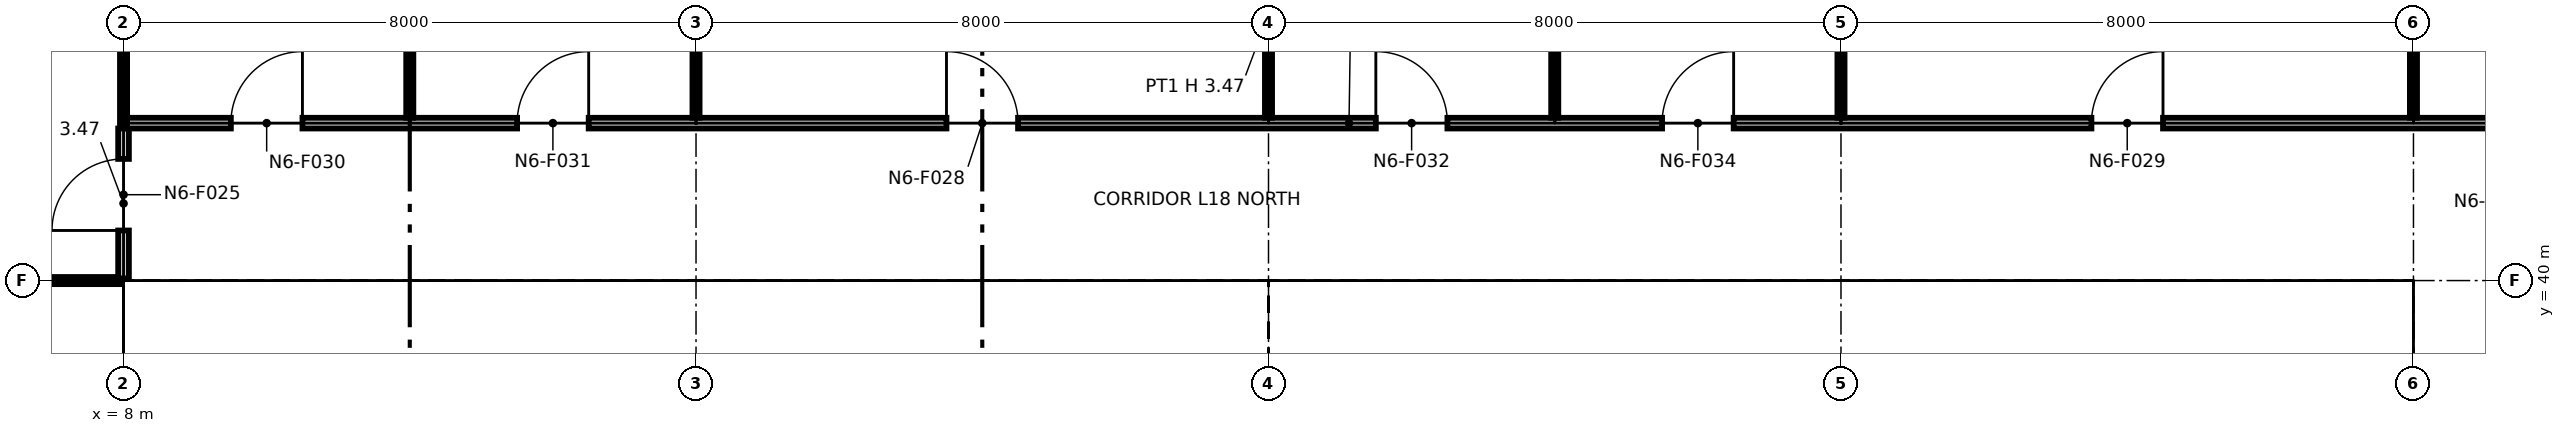
"""IFC4 building model, lengths in metres.
Left out: names, types, materials, properties, quantities, classifications, styles, units other than length and angle.
Written with IfcOpenShell. Run it as: python <this file> out.ifc"""

import sys

from ifc_helpers import new_model, si_unit, direction, frame, frame_2d, origin, origin_2d, place, context, subcontext, project, spatial, polyline, rectangle, i_section, outline, extrude, element, fill, save


model = new_model("IFC4")
c1 = context("Model", 3, precision=1e-05, world=origin(), true_north=direction((0.0, 1.0)))
c2 = subcontext(c1, "Body", "Model", "MODEL_VIEW")
j1 = project(units=[si_unit("LENGTHUNIT", "METRE"), si_unit("PLANEANGLEUNIT", "RADIAN")], contexts=[c1])
p1 = place(None, origin())
s1 = spatial("IfcSite", under=j1, at=p1, CompositionType="ELEMENT")
p2 = place(p1, origin())
s2 = spatial("IfcBuilding", under=s1, at=p2, CompositionType="ELEMENT")
p3 = place(p2, frame((0.0, 0.0, 96.4)))
s3 = spatial("IfcBuildingStorey", under=s2, at=p3, CompositionType="ELEMENT", Elevation=96.4)
for number, where, z_axis, x_axis in (
    (1, (8.0, 40.0, 0.0), (0.0, 0.0, 1.0), (1.0, 0.0, 0.0)),
    (2, (16.0, 40.0, 0.0), (0.0, 0.0, 1.0), (1.0, 0.0, 0.0)),
):
    element("IfcColumn", number, at=place(p3, frame(where, z_axis=z_axis, x_axis=x_axis)), inside=s3, PredefinedType="COLUMN", context=c2, shape_type="SweptSolid", body=[
        extrude(i_section(OverallWidth=0.373, OverallDepth=0.368, WebThickness=0.015, FlangeThickness=0.024, at=origin_2d()), origin(), (0.0, 0.0, 1.0), 4.25),
    ])
p4 = place(p3, frame((24.0, 40.0, 0.0), z_axis=(0.0, 0.0, 1.0), x_axis=(1.0, 0.0, 0.0)))
e3 = element("IfcColumn", 3, at=p4, inside=s3, PredefinedType="COLUMN", context=c2, shape_type="SweptSolid", body=[
    extrude(i_section(OverallWidth=0.394, OverallDepth=0.376, WebThickness=0.017, FlangeThickness=0.028, at=origin_2d()), origin(), (0.0, 0.0, 1.0), 4.25),
])
for number, where, z_axis, x_axis in (
    (4, (32.0, 40.0, 0.0), (0.0, 0.0, 1.0), (1.0, 0.0, 0.0)),
    (5, (40.0, 40.0, 0.0), (0.0, 0.0, 1.0), (1.0, 0.0, 0.0)),
):
    element("IfcColumn", number, at=place(p3, frame(where, z_axis=z_axis, x_axis=x_axis)), inside=s3, PredefinedType="COLUMN", context=c2, shape_type="SweptSolid", body=[
        extrude(i_section(OverallWidth=0.257, OverallDepth=0.363, WebThickness=0.013, FlangeThickness=0.022, at=origin_2d()), origin(), (0.0, 0.0, 1.0), 4.25),
    ])
p5 = place(p3, frame((8.75, 32.85, 0.0), z_axis=(0.0, 0.0, 1.0), x_axis=(0.0, 1.0, 0.0)))
e6 = element("IfcWall", 6, at=p5, inside=s3, PredefinedType="PARTITIONING", context=c2, shape_type="SweptSolid", body=[
    extrude(outline(polyline([(0.0, 0.0), (6.3, 0.0), (6.3, 4.25), (3.231, 4.25), (3.23, 3.789), (3.07, 3.789), (3.069, 4.25), (0.0, 4.25), (0.0, 0.0)])), frame((0.0, 0.1, 0.0), z_axis=(0.0, -1.0, 0.0), x_axis=(1.0, 0.0, 0.0)), (0.0, 0.0, 1.0), 0.2),
])
p6 = place(p3, frame((8.65, 39.25, 0.0), z_axis=(0.0, 0.0, 1.0), x_axis=(1.0, 0.0, 0.0)))
e7 = element("IfcWall", 7, at=p6, inside=s3, PredefinedType="PARTITIONING", context=c2, shape_type="SweptSolid", body=[
    extrude(outline(polyline([(0.0, 0.0), (14.7, 0.0), (14.7, 4.25), (7.469, 4.25), (7.469, 3.632), (7.231, 3.632), (7.23, 4.25), (0.0, 4.25), (0.0, 0.0)])), frame((0.0, 0.1, 0.0), z_axis=(0.0, -1.0, 0.0), x_axis=(1.0, 0.0, 0.0)), (0.0, 0.0, 1.0), 0.2),
])
for number, where, z_axis, x_axis in (
    (8, (10.675, 34.95, 0.0), (0.0, 0.0, 1.0), (0.0, 1.0, 0.0)),
    (9, (12.425, 34.95, 0.0), (0.0, 0.0, 1.0), (0.0, 1.0, 0.0)),
    (10, (14.275, 34.95, 0.0), (0.0, 0.0, 1.0), (0.0, 1.0, 0.0)),
):
    element("IfcWall", number, at=place(p3, frame(where, z_axis=z_axis, x_axis=x_axis)), inside=s3, PredefinedType="PARTITIONING", context=c2, shape_type="SweptSolid", body=[
        extrude(outline(polyline([(0.0, 0.0), (4.2, 0.0), (4.2, 4.25), (1.132, 4.25), (1.131, 3.789), (0.969, 3.789), (0.969, 4.25), (0.0, 4.25), (0.0, 0.0)])), frame((0.0, 0.075, 0.0), z_axis=(0.0, -1.0, 0.0), x_axis=(1.0, 0.0, 0.0)), (0.0, 0.0, 1.0), 0.15),
    ])
p7 = place(p3, frame((16.0, 34.95, 0.0), z_axis=(0.0, 0.0, 1.0), x_axis=(0.0, 1.0, 0.0)))
e11 = element("IfcWall", 11, at=p7, inside=s3, PredefinedType="PARTITIONING", context=c2, shape_type="SweptSolid", body=[
    extrude(rectangle(XDim=4.2, YDim=0.6, at=frame_2d((2.1, 0.0))), origin(), (0.0, 0.0, 1.0), 3.632),
])
for number, where, z_axis, x_axis in (
    (12, (19.2, 32.85, 0.0), (0.0, 0.0, 1.0), (0.0, 1.0, 0.0)),
    (13, (23.25, 32.85, 0.0), (0.0, 0.0, 1.0), (0.0, 1.0, 0.0)),
):
    element("IfcWall", number, at=place(p3, frame(where, z_axis=z_axis, x_axis=x_axis)), inside=s3, PredefinedType="PARTITIONING", context=c2, shape_type="SweptSolid", body=[
        extrude(rectangle(XDim=6.3, YDim=0.2, at=frame_2d((3.15, 0.0))), origin(), (0.0, 0.0, 1.0), 4.25),
    ])
p8 = place(p3, frame((24.75, 32.85, 0.0), z_axis=(0.0, 0.0, 1.0), x_axis=(0.0, 1.0, 0.0)))
e14 = element("IfcWall", 14, at=p8, inside=s3, PredefinedType="PARTITIONING", context=c2, shape_type="SweptSolid", body=[
    extrude(outline(polyline([(0.0, 0.0), (6.3, 0.0), (6.3, 4.25), (3.231, 4.25), (3.23, 3.789), (3.07, 3.789), (3.069, 4.25), (0.0, 4.25), (0.0, 0.0)])), frame((0.0, 0.1, 0.0), z_axis=(0.0, -1.0, 0.0), x_axis=(1.0, 0.0, 0.0)), (0.0, 0.0, 1.0), 0.2),
])
p9 = place(p3, frame((24.65, 39.25, 0.0), z_axis=(0.0, 0.0, 1.0), x_axis=(1.0, 0.0, 0.0)))
e15 = element("IfcWall", 15, at=p9, inside=s3, PredefinedType="PARTITIONING", context=c2, shape_type="SweptSolid", body=[
    extrude(outline(polyline([(0.0, 0.0), (14.7, 0.0), (14.7, 4.25), (7.469, 4.25), (7.469, 3.632), (7.231, 3.632), (7.23, 4.25), (0.0, 4.25), (0.0, 0.0)])), frame((0.0, 0.1, 0.0), z_axis=(0.0, -1.0, 0.0), x_axis=(1.0, 0.0, 0.0)), (0.0, 0.0, 1.0), 0.2),
])
for number, where, z_axis, x_axis in (
    (16, (27.2, 36.4, 0.0), (0.0, 0.0, 1.0), (0.0, 1.0, 0.0)),
    (17, (29.5, 36.4, 0.0), (0.0, 0.0, 1.0), (0.0, 1.0, 0.0)),
):
    element("IfcWall", number, at=place(p3, frame(where, z_axis=z_axis, x_axis=x_axis)), inside=s3, PredefinedType="PARTITIONING", context=c2, shape_type="SweptSolid", body=[
        extrude(rectangle(XDim=2.75, YDim=0.2, at=frame_2d((1.375, 0.0))), origin(), (0.0, 0.0, 1.0), 4.25),
    ])
p10 = place(p3, frame((32.0, 32.85, 0.0), z_axis=(0.0, 0.0, 1.0), x_axis=(0.0, 1.0, 0.0)))
e18 = element("IfcWall", 18, at=p10, inside=s3, PredefinedType="PARTITIONING", context=c2, shape_type="SweptSolid", body=[
    extrude(rectangle(XDim=6.3, YDim=0.6, at=frame_2d((3.15, 0.0))), origin(), (0.0, 0.0, 1.0), 3.632),
])
for number, where, z_axis, x_axis in (
    (19, (35.6, 32.85, 0.0), (0.0, 0.0, 1.0), (0.0, 1.0, 0.0)),
    (20, (39.25, 32.85, 0.0), (0.0, 0.0, 1.0), (0.0, 1.0, 0.0)),
):
    element("IfcWall", number, at=place(p3, frame(where, z_axis=z_axis, x_axis=x_axis)), inside=s3, PredefinedType="PARTITIONING", context=c2, shape_type="SweptSolid", body=[
        extrude(rectangle(XDim=6.3, YDim=0.2, at=frame_2d((3.15, 0.0))), origin(), (0.0, 0.0, 1.0), 4.25),
    ])
p11 = place(p3, frame((4.05, 40.0, 0.0), z_axis=(0.0, 0.0, 1.0), x_axis=(1.0, 0.0, 0.0)))
e21 = element("IfcWall", 21, at=p11, inside=s3, PredefinedType="PARTITIONING", context=c2, shape_type="SweptSolid", body=[
    extrude(rectangle(XDim=3.92, YDim=0.1, at=frame_2d((1.96, 0.0))), origin(), (0.0, 0.0, 1.0), 3.47),
])
p12 = place(p3, frame((8.0, 40.03, 0.0), z_axis=(0.0, 0.0, 1.0), x_axis=(0.0, 1.0, 0.0)))
e22 = element("IfcWall", 22, at=p12, inside=s3, PredefinedType="PARTITIONING", context=c2, shape_type="SweptSolid", body=[
    extrude(rectangle(XDim=2.095, YDim=0.15, at=frame_2d((1.047, 0.0))), origin(), (0.0, 0.0, 1.0), 3.47),
])
p13 = place(p12, frame((0.67, 0.0, 0.0)))
e23 = element("IfcOpeningElement", 23, at=p13, cuts=e22, PredefinedType="OPENING", context=c2, shape_type="SweptSolid", body=[
    extrude(rectangle(XDim=1.0, YDim=2.1, at=frame_2d((0.5, 1.05))), frame((0.0, 0.085, 0.0), z_axis=(0.0, -1.0, 0.0), x_axis=(1.0, 0.0, 0.0)), (0.0, 0.0, 1.0), 0.17),
])
p14 = place(p3, frame((8.05, 42.2, 0.0), z_axis=(0.0, 0.0, 1.0), x_axis=(1.0, 0.0, 0.0)))
e24 = element("IfcWall", 24, at=p14, inside=s3, PredefinedType="PARTITIONING", context=c2, shape_type="SweptSolid", body=[
    extrude(rectangle(XDim=34.15, YDim=0.15, at=frame_2d((17.075, 0.0))), origin(), (0.0, 0.0, 1.0), 4.25),
])
p15 = place(p14, frame((11.45, 0.0, 0.0)))
e25 = element("IfcOpeningElement", 25, at=p15, cuts=e24, PredefinedType="OPENING", context=c2, shape_type="SweptSolid", body=[
    extrude(rectangle(XDim=1.0, YDim=2.1, at=frame_2d((0.5, 1.05))), frame((0.0, 0.085, 0.0), z_axis=(0.0, -1.0, 0.0), x_axis=(1.0, 0.0, 0.0)), (0.0, 0.0, 1.0), 0.17),
])
p16 = place(p14, frame((27.45, 0.0, 0.0)))
e26 = element("IfcOpeningElement", 26, at=p16, cuts=e24, PredefinedType="OPENING", context=c2, shape_type="SweptSolid", body=[
    extrude(rectangle(XDim=1.0, YDim=2.1, at=frame_2d((0.5, 1.05))), frame((0.0, 0.085, 0.0), z_axis=(0.0, -1.0, 0.0), x_axis=(1.0, 0.0, 0.0)), (0.0, 0.0, 1.0), 0.17),
])
p17 = place(p14, frame((1.45, 0.0, 0.0)))
e27 = element("IfcOpeningElement", 27, at=p17, cuts=e24, PredefinedType="OPENING", context=c2, shape_type="SweptSolid", body=[
    extrude(rectangle(XDim=1.0, YDim=2.1, at=frame_2d((0.5, 1.05))), frame((0.0, 0.085, 0.0), z_axis=(0.0, -1.0, 0.0), x_axis=(1.0, 0.0, 0.0)), (0.0, 0.0, 1.0), 0.17),
])
p18 = place(p14, frame((5.45, 0.0, 0.0)))
e28 = element("IfcOpeningElement", 28, at=p18, cuts=e24, PredefinedType="OPENING", context=c2, shape_type="SweptSolid", body=[
    extrude(rectangle(XDim=1.0, YDim=2.1, at=frame_2d((0.5, 1.05))), frame((0.0, 0.085, 0.0), z_axis=(0.0, -1.0, 0.0), x_axis=(1.0, 0.0, 0.0)), (0.0, 0.0, 1.0), 0.17),
])
p19 = place(p14, frame((17.45, 0.0, 0.0)))
e29 = element("IfcOpeningElement", 29, at=p19, cuts=e24, PredefinedType="OPENING", context=c2, shape_type="SweptSolid", body=[
    extrude(rectangle(XDim=1.0, YDim=2.1, at=frame_2d((0.5, 1.05))), frame((0.0, 0.085, 0.0), z_axis=(0.0, -1.0, 0.0), x_axis=(1.0, 0.0, 0.0)), (0.0, 0.0, 1.0), 0.17),
])
p20 = place(p14, frame((21.45, 0.0, 0.0)))
e30 = element("IfcOpeningElement", 30, at=p20, cuts=e24, PredefinedType="OPENING", context=c2, shape_type="SweptSolid", body=[
    extrude(rectangle(XDim=1.0, YDim=2.1, at=frame_2d((0.5, 1.05))), frame((0.0, 0.085, 0.0), z_axis=(0.0, -1.0, 0.0), x_axis=(1.0, 0.0, 0.0)), (0.0, 0.0, 1.0), 0.17),
])
p21 = place(p3, frame((8.0, 42.2, 0.0), z_axis=(0.0, 0.0, 1.0), x_axis=(0.0, 1.0, 0.0)))
e31 = element("IfcWall", 31, at=p21, inside=s3, PredefinedType="PARTITIONING", context=c2, shape_type="SweptSolid", body=[
    extrude(rectangle(XDim=5.67, YDim=0.1, at=frame_2d((2.835, 0.0))), origin(), (0.0, 0.0, 1.0), 3.47),
])
p22 = place(p3, frame((12.0, 42.275, 0.0), z_axis=(0.0, 0.0, 1.0), x_axis=(0.0, 1.0, 0.0)))
e32 = element("IfcWall", 32, at=p22, inside=s3, PredefinedType="PARTITIONING", context=c2, shape_type="SweptSolid", body=[
    extrude(outline(polyline([(0.0, 0.0), (5.595, 0.0), (5.595, 4.25), (2.025, 4.25), (2.023, 3.47), (1.427, 3.47), (1.425, 4.25), (0.0, 4.25), (0.0, 0.0)])), frame((0.0, 0.05, 0.0), z_axis=(0.0, -1.0, 0.0), x_axis=(1.0, 0.0, 0.0)), (0.0, 0.0, 1.0), 0.1),
])
for number, where, z_axis, x_axis in (
    (33, (16.0, 42.275, 0.0), (0.0, 0.0, 1.0), (0.0, 1.0, 0.0)),
    (34, (24.0, 42.275, 0.0), (0.0, 0.0, 1.0), (0.0, 1.0, 0.0)),
):
    element("IfcWall", number, at=place(p3, frame(where, z_axis=z_axis, x_axis=x_axis)), inside=s3, PredefinedType="PARTITIONING", context=c2, shape_type="SweptSolid", body=[
        extrude(rectangle(XDim=2.895, YDim=0.1, at=frame_2d((1.448, 0.0))), origin(), (0.0, 0.0, 1.0), 3.47),
    ])
p23 = place(p3, frame((28.0, 42.275, 0.0), z_axis=(0.0, 0.0, 1.0), x_axis=(0.0, 1.0, 0.0)))
e35 = element("IfcWall", 35, at=p23, inside=s3, PredefinedType="PARTITIONING", context=c2, shape_type="SweptSolid", body=[
    extrude(rectangle(XDim=3.375, YDim=0.1, at=frame_2d((1.688, 0.0))), origin(), (0.0, 0.0, 1.0), 3.47),
])
for number, where, z_axis, x_axis in (
    (36, (32.0, 42.275, 0.0), (0.0, 0.0, 1.0), (0.0, 1.0, 0.0)),
    (37, (40.0, 42.275, 0.0), (0.0, 0.0, 1.0), (0.0, 1.0, 0.0)),
):
    element("IfcWall", number, at=place(p3, frame(where, z_axis=z_axis, x_axis=x_axis)), inside=s3, PredefinedType="PARTITIONING", context=c2, shape_type="SweptSolid", body=[
        extrude(rectangle(XDim=2.895, YDim=0.1, at=frame_2d((1.448, 0.0))), origin(), (0.0, 0.0, 1.0), 3.47),
    ])
p24 = place(p13, origin())
e38 = element("IfcDoor", 38, at=p24, inside=s3, OperationType="SINGLE_SWING_LEFT", PredefinedType="DOOR", context=c2, shape_type="SweptSolid", body=[
    extrude(rectangle(XDim=1.0, YDim=2.1, at=frame_2d((0.5, 1.05))), frame((0.0, 0.025, 0.0), z_axis=(0.0, -1.0, 0.0), x_axis=(1.0, 0.0, 0.0)), (0.0, 0.0, 1.0), 0.05),
])
fill(e23, e38)
p25 = place(p15, origin())
e39 = element("IfcDoor", 39, at=p25, inside=s3, OperationType="SINGLE_SWING_LEFT", PredefinedType="DOOR", context=c2, shape_type="SweptSolid", body=[
    extrude(rectangle(XDim=1.0, YDim=2.1, at=frame_2d((0.5, 1.05))), frame((0.0, 0.025, 0.0), z_axis=(0.0, -1.0, 0.0), x_axis=(1.0, 0.0, 0.0)), (0.0, 0.0, 1.0), 0.05),
])
fill(e25, e39)
p26 = place(p16, origin())
e40 = element("IfcDoor", 40, at=p26, inside=s3, OperationType="SINGLE_SWING_RIGHT", PredefinedType="DOOR", context=c2, shape_type="SweptSolid", body=[
    extrude(rectangle(XDim=1.0, YDim=2.1, at=frame_2d((0.5, 1.05))), frame((0.0, 0.025, 0.0), z_axis=(0.0, -1.0, 0.0), x_axis=(1.0, 0.0, 0.0)), (0.0, 0.0, 1.0), 0.05),
])
fill(e26, e40)
p27 = place(p17, origin())
e41 = element("IfcDoor", 41, at=p27, inside=s3, OperationType="SINGLE_SWING_RIGHT", PredefinedType="DOOR", context=c2, shape_type="SweptSolid", body=[
    extrude(rectangle(XDim=1.0, YDim=2.1, at=frame_2d((0.5, 1.05))), frame((0.0, 0.025, 0.0), z_axis=(0.0, -1.0, 0.0), x_axis=(1.0, 0.0, 0.0)), (0.0, 0.0, 1.0), 0.05),
])
fill(e27, e41)
p28 = place(p18, origin())
e42 = element("IfcDoor", 42, at=p28, inside=s3, OperationType="SINGLE_SWING_RIGHT", PredefinedType="DOOR", context=c2, shape_type="SweptSolid", body=[
    extrude(rectangle(XDim=1.0, YDim=2.1, at=frame_2d((0.5, 1.05))), frame((0.0, 0.025, 0.0), z_axis=(0.0, -1.0, 0.0), x_axis=(1.0, 0.0, 0.0)), (0.0, 0.0, 1.0), 0.05),
])
fill(e28, e42)
p29 = place(p19, origin())
e43 = element("IfcDoor", 43, at=p29, inside=s3, OperationType="SINGLE_SWING_LEFT", PredefinedType="DOOR", context=c2, shape_type="SweptSolid", body=[
    extrude(rectangle(XDim=1.0, YDim=2.1, at=frame_2d((0.5, 1.05))), frame((0.0, 0.025, 0.0), z_axis=(0.0, -1.0, 0.0), x_axis=(1.0, 0.0, 0.0)), (0.0, 0.0, 1.0), 0.05),
])
fill(e29, e43)
p30 = place(p20, origin())
e44 = element("IfcDoor", 44, at=p30, inside=s3, OperationType="SINGLE_SWING_RIGHT", PredefinedType="DOOR", context=c2, shape_type="SweptSolid", body=[
    extrude(rectangle(XDim=1.0, YDim=2.1, at=frame_2d((0.5, 1.05))), frame((0.0, 0.025, 0.0), z_axis=(0.0, -1.0, 0.0), x_axis=(1.0, 0.0, 0.0)), (0.0, 0.0, 1.0), 0.05),
])
fill(e30, e44)
save(model, sys.argv[1])
